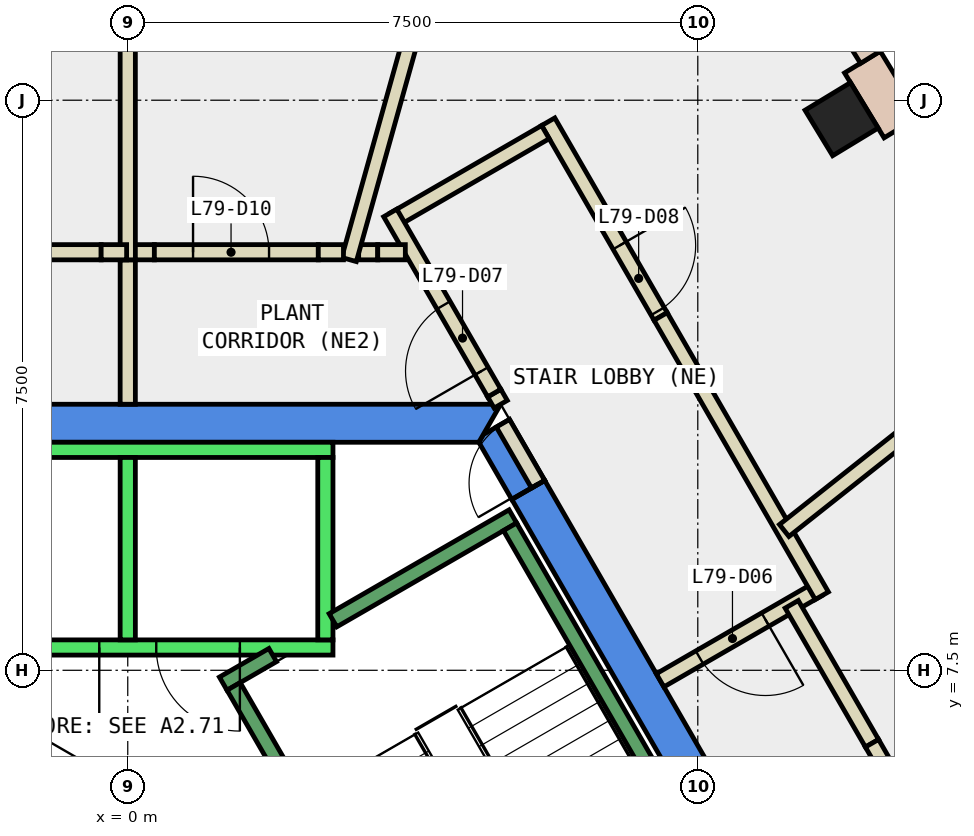
"""IFC4 building model, lengths in metres.
Left out: names, types, materials, properties, quantities, classifications, styles, units other than length and angle.
Written with IfcOpenShell. Run it as: python <this file> out.ifc"""

import sys

from ifc_helpers import new_model, si_unit, direction, frame, frame_2d, origin, origin_2d, place, context, subcontext, project, spatial, polyline, rectangle, outline, extrude, element, fill, save


model = new_model("IFC4")
c1 = context("Model", 3, precision=1e-05, world=origin(), true_north=direction((0.0, 1.0)))
c2 = subcontext(c1, "Body", "Model", "MODEL_VIEW")
j1 = project(units=[si_unit("LENGTHUNIT", "METRE"), si_unit("PLANEANGLEUNIT", "RADIAN")], contexts=[c1])
p1 = place(None, origin())
s1 = spatial("IfcSite", under=j1, at=p1, CompositionType="ELEMENT")
p2 = place(p1, origin())
s2 = spatial("IfcBuilding", under=s1, at=p2, CompositionType="ELEMENT")
p3 = place(p2, frame((0.0, 0.0, 335.9)))
s3 = spatial("IfcBuildingStorey", under=s2, at=p3, CompositionType="ELEMENT", Elevation=335.9)
p4 = place(p3, frame((9.392, 14.751, -0.35), z_axis=(0.0, 0.0, 1.0), x_axis=(-0.519310312694, 0.85458574709, 0.0)))
e1 = element("IfcColumn", 1, at=p4, inside=s3, PredefinedType="COLUMN", context=c2, shape_type="SweptSolid", body=[
    extrude(rectangle(XDim=0.7, YDim=0.7, at=origin_2d()), origin(), (0.0, 0.0, 1.0), 4.4),
])
p5 = place(p3, frame((0.0, 0.0, -0.35)))
e2 = element("IfcWall", 2, at=p5, inside=s3, PredefinedType="SHEAR", context=c2, shape_type="SweptSolid", body=[
    extrude(outline(polyline([(5.486, 9.998), (5.053, 9.748), (9.238, 2.5), (9.815, 2.5), (5.486, 9.998)])), origin(), (0.0, 0.0, 1.0), 4.4),
])
p6 = place(p3, frame((0.0, 0.0, 3.6)))
e3 = element("IfcWall", 3, at=p6, inside=s3, PredefinedType="SHEAR", context=c2, shape_type="SweptSolid", body=[
    extrude(outline(polyline([(5.022, 10.8), (4.677, 10.601), (4.619, 10.5), (5.053, 9.748), (5.486, 9.998), (5.022, 10.8)])), origin(), (0.0, 0.0, 1.0), 0.45),
])
p7 = place(p3, frame((0.0, 0.0, -0.35)))
e4 = element("IfcWall", 4, at=p7, inside=s3, PredefinedType="SHEAR", context=c2, shape_type="SweptSolid", body=[
    extrude(outline(polyline([(4.907, 11.0), (-4.907, 11.0), (-4.619, 10.5), (4.619, 10.5), (4.907, 11.0)])), origin(), (0.0, 0.0, 1.0), 4.4),
])
p8 = place(p3, frame((10.186, 14.648, 0.0), z_axis=(0.0, 0.0, 1.0), x_axis=(-0.520086370604, 0.854113673414, 0.0)))
e5 = element("IfcWall", 5, at=p8, inside=s3, PredefinedType="STANDARD", context=c2, shape_type="SweptSolid", body=[
    extrude(rectangle(XDim=1.0, YDim=0.55, at=frame_2d((0.5, 0.0))), origin(), (0.0, 0.0, 1.0), 4.05),
])
p9 = place(p3, frame((9.769, 15.564, 0.0), z_axis=(0.0, 0.0, 1.0), x_axis=(-0.528920387505, 0.848671446251, 0.0)))
e6 = element("IfcWall", 6, at=p9, inside=s3, PredefinedType="STANDARD", context=c2, shape_type="SweptSolid", body=[
    extrude(rectangle(XDim=7.043, YDim=0.3, at=frame_2d((3.521, 0.0))), origin(), (0.0, 0.0, 1.0), 4.05),
])
p10 = place(p9, frame((0.561, 0.0, 0.9)))
e7 = element("IfcOpeningElement", 7, at=p10, cuts=e6, PredefinedType="OPENING", context=c2, shape_type="SweptSolid", body=[
    extrude(rectangle(XDim=2.4, YDim=3.0, at=frame_2d((1.2, 1.5))), frame((0.0, 0.16, 0.0), z_axis=(0.0, -1.0, 0.0), x_axis=(1.0, 0.0, 0.0)), (0.0, 0.0, 1.0), 0.32),
])
p11 = place(p9, frame((4.082, 0.0, 0.9)))
e8 = element("IfcOpeningElement", 8, at=p11, cuts=e6, PredefinedType="OPENING", context=c2, shape_type="SweptSolid", body=[
    extrude(rectangle(XDim=2.4, YDim=3.0, at=frame_2d((1.2, 1.5))), frame((0.0, 0.16, 0.0), z_axis=(0.0, -1.0, 0.0), x_axis=(1.0, 0.0, 0.0)), (0.0, 0.0, 1.0), 0.32),
])
p12 = place(p3, frame((9.082, 8.568, 0.0), z_axis=(0.0, 0.0, 1.0), x_axis=(-0.865955154139, -0.50012165622, 0.0)))
e9 = element("IfcWall", 9, at=p12, inside=s3, PredefinedType="PARTITIONING", context=c2, shape_type="SweptSolid", body=[
    extrude(rectangle(XDim=2.4, YDim=0.2, at=frame_2d((1.2, 0.0))), origin(), (0.0, 0.0, 1.0), 4.05),
])
p13 = place(p12, frame((0.8, 0.0, 0.0)))
e10 = element("IfcOpeningElement", 10, at=p13, cuts=e9, PredefinedType="OPENING", context=c2, shape_type="SweptSolid", body=[
    extrude(rectangle(XDim=1.0, YDim=2.1, at=frame_2d((0.5, 1.05))), frame((0.0, 0.11, 0.0), z_axis=(0.0, -1.0, 0.0), x_axis=(1.0, 0.0, 0.0)), (0.0, 0.0, 1.0), 0.22),
])
p14 = place(p3, frame((4.907, 11.0, 0.0), z_axis=(0.0, 0.0, 1.0), x_axis=(-0.5004692653, 0.865754303766, 0.0)))
e11 = element("IfcWall", 11, at=p14, inside=s3, PredefinedType="PARTITIONING", context=c2, shape_type="SweptSolid", body=[
    extrude(rectangle(XDim=0.17, YDim=0.2, at=frame_2d((0.085, 0.0))), origin(), (0.0, 0.0, 1.0), 2.4),
])
p15 = place(p3, frame((5.532, 14.717, 0.0), z_axis=(0.0, 0.0, 1.0), x_axis=(0.499955822529, -0.866050908157, 0.0)))
e12 = element("IfcWall", 12, at=p15, inside=s3, PredefinedType="PARTITIONING", context=c2, shape_type="SweptSolid", body=[
    extrude(rectangle(XDim=2.958, YDim=0.2, at=frame_2d((1.479, 0.0))), origin(), (0.0, 0.0, 1.0), 4.05),
])
p16 = place(p15, frame((1.88, 0.0, 0.0)))
e13 = element("IfcOpeningElement", 13, at=p16, cuts=e12, PredefinedType="OPENING", context=c2, shape_type="SweptSolid", body=[
    extrude(rectangle(XDim=1.0, YDim=2.1, at=frame_2d((0.5, 1.05))), frame((0.0, 0.11, 0.0), z_axis=(0.0, -1.0, 0.0), x_axis=(1.0, 0.0, 0.0)), (0.0, 0.0, 1.0), 0.22),
])
p17 = place(p3, frame((3.504, 13.43, 0.0), z_axis=(0.0, 0.0, 1.0), x_axis=(0.865927408828, 0.500169693844, 0.0)))
e14 = element("IfcWall", 14, at=p17, inside=s3, PredefinedType="PARTITIONING", context=c2, shape_type="SweptSolid", body=[
    extrude(rectangle(XDim=2.3, YDim=0.2, at=frame_2d((1.15, 0.0))), origin(), (0.0, 0.0, 1.0), 4.05),
])
p18 = place(p3, frame((8.736, 8.368, 0.0), z_axis=(0.0, 0.0, 1.0), x_axis=(0.500206302225, -0.865906262372, 0.0)))
e15 = element("IfcWall", 15, at=p18, inside=s3, PredefinedType="PARTITIONING", context=c2, shape_type="SweptSolid", body=[
    extrude(rectangle(XDim=2.111, YDim=0.2, at=frame_2d((1.055, 0.0))), origin(), (0.0, 0.0, 1.0), 4.05),
])
p19 = place(p3, frame((3.038, 13.0, 0.0), z_axis=(0.0, 0.0, 1.0), x_axis=(1.0, 0.0, 0.0)))
e16 = element("IfcWall", 16, at=p19, inside=s3, PredefinedType="PARTITIONING", context=c2, shape_type="SweptSolid", body=[
    extrude(rectangle(XDim=0.251, YDim=0.2, at=frame_2d((0.125, 0.0))), origin(), (0.0, 0.0, 1.0), 1.95),
])
p20 = place(p3, frame((0.015, 13.0, 0.0), z_axis=(0.0, 0.0, 1.0), x_axis=(1.0, 0.0, 0.0)))
e17 = element("IfcWall", 17, at=p20, inside=s3, PredefinedType="PARTITIONING", context=c2, shape_type="SweptSolid", body=[
    extrude(rectangle(XDim=0.335, YDim=0.2, at=frame_2d((0.167, 0.0))), origin(), (0.0, 0.0, 1.0), 1.95),
])
p21 = place(p3, frame((0.0, 11.0, 0.0), z_axis=(0.0, 0.0, 1.0), x_axis=(0.0, 1.0, 0.0)))
e18 = element("IfcWall", 18, at=p21, inside=s3, PredefinedType="PARTITIONING", context=c2, shape_type="SweptSolid", body=[
    extrude(rectangle(XDim=1.9, YDim=0.2, at=frame_2d((0.95, 0.0))), origin(), (0.0, 0.0, 1.0), 1.95),
])
p22 = place(p3, frame((2.911, 12.904, 0.0), z_axis=(0.0, 0.0, 1.0), x_axis=(0.269466315524, 0.963009815525, 0.0)))
e19 = element("IfcWall", 19, at=p22, inside=s3, PredefinedType="PARTITIONING", context=c2, shape_type="SweptSolid", body=[
    extrude(rectangle(XDim=8.413, YDim=0.2, at=frame_2d((4.207, 0.0))), origin(), (0.0, 0.0, 1.0), 1.95),
])
p23 = place(p3, frame((0.0, 12.9, 0.0), z_axis=(0.0, 0.0, 1.0), x_axis=(0.0, 1.0, 0.0)))
e20 = element("IfcWall", 20, at=p23, inside=s3, PredefinedType="PARTITIONING", context=c2, shape_type="SweptSolid", body=[
    extrude(rectangle(XDim=10.092, YDim=0.2, at=frame_2d((5.046, 0.0))), origin(), (0.0, 0.0, 1.0), 1.95),
])
p24 = place(p3, frame((5.399, 9.948, 0.0), z_axis=(0.0, 0.0, 1.0), x_axis=(-0.499882215713, 0.866093395895, 0.0)))
e21 = element("IfcWall", 21, at=p24, inside=s3, PredefinedType="PARTITIONING", context=c2, shape_type="SweptSolid", body=[
    extrude(rectangle(XDim=0.926, YDim=0.2, at=frame_2d((0.463, 0.0))), origin(), (0.0, 0.0, 1.0), 2.4),
])
p25 = place(p24, frame((0.017, 0.0, 0.0)))
e22 = element("IfcOpeningElement", 22, at=p25, cuts=e21, PredefinedType="OPENING", context=c2, shape_type="SweptSolid", body=[
    extrude(rectangle(XDim=0.9, YDim=2.1, at=frame_2d((0.45, 1.05))), frame((0.0, 0.11, 0.0), z_axis=(0.0, -1.0, 0.0), x_axis=(1.0, 0.0, 0.0)), (0.0, 0.0, 1.0), 0.22),
])
p26 = place(p3, frame((4.822, 11.147, 0.0), z_axis=(0.0, 0.0, 1.0), x_axis=(-0.499871764879, 0.866099427708, 0.0)))
e23 = element("IfcWall", 23, at=p26, inside=s3, PredefinedType="PARTITIONING", context=c2, shape_type="SweptSolid", body=[
    extrude(rectangle(XDim=2.737, YDim=0.2, at=frame_2d((1.368, 0.0))), origin(), (0.0, 0.0, 1.0), 4.05),
])
p27 = place(p26, frame((0.335, 0.0, 0.0)))
e24 = element("IfcOpeningElement", 24, at=p27, cuts=e23, PredefinedType="OPENING", context=c2, shape_type="SweptSolid", body=[
    extrude(rectangle(XDim=1.0, YDim=2.1, at=frame_2d((0.5, 1.05))), frame((0.0, 0.11, 0.0), z_axis=(0.0, -1.0, 0.0), x_axis=(1.0, 0.0, 0.0)), (0.0, 0.0, 1.0), 0.22),
])
p28 = place(p3, frame((7.011, 12.155, 0.0), z_axis=(0.0, 0.0, 1.0), x_axis=(0.499772878723, -0.866156492612, 0.0)))
e25 = element("IfcWall", 25, at=p28, inside=s3, PredefinedType="PARTITIONING", context=c2, shape_type="SweptSolid", body=[
    extrude(rectangle(XDim=0.838, YDim=0.2, at=frame_2d((0.419, 0.0))), origin(), (0.0, 0.0, 1.0), 1.95),
])
p29 = place(p3, frame((7.43, 11.429, 0.0), z_axis=(0.0, 0.0, 1.0), x_axis=(0.500026652407, -0.866010015463, 0.0)))
e26 = element("IfcWall", 26, at=p29, inside=s3, PredefinedType="PARTITIONING", context=c2, shape_type="SweptSolid", body=[
    extrude(rectangle(XDim=3.404, YDim=0.2, at=frame_2d((1.702, 0.0))), origin(), (0.0, 0.0, 1.0), 4.05),
])
p30 = place(p3, frame((9.792, 6.54, 0.0), z_axis=(0.0, 0.0, 1.0), x_axis=(0.49924847323, -0.866458863408, 0.0)))
e27 = element("IfcWall", 27, at=p30, inside=s3, PredefinedType="PARTITIONING", context=c2, shape_type="SweptSolid", body=[
    extrude(rectangle(XDim=0.743, YDim=0.2, at=frame_2d((0.372, 0.0))), origin(), (0.0, 0.0, 1.0), 1.95),
])
p31 = place(p3, frame((3.289, 13.0, 0.0), z_axis=(0.0, 0.0, 1.0), x_axis=(1.0, 0.0, 0.0)))
e28 = element("IfcWall", 28, at=p31, inside=s3, PredefinedType="PARTITIONING", context=c2, shape_type="SweptSolid", body=[
    extrude(rectangle(XDim=0.363, YDim=0.2, at=frame_2d((0.182, 0.0))), origin(), (0.0, 0.0, 1.0), 4.05),
])
p32 = place(p3, frame((0.35, 13.0, 0.0), z_axis=(0.0, 0.0, 1.0), x_axis=(1.0, 0.0, 0.0)))
e29 = element("IfcWall", 29, at=p32, inside=s3, PredefinedType="PARTITIONING", context=c2, shape_type="SweptSolid", body=[
    extrude(rectangle(XDim=2.157, YDim=0.2, at=frame_2d((1.079, 0.0))), origin(), (0.0, 0.0, 1.0), 4.05),
])
p33 = place(p32, frame((0.509, 0.0, 0.0)))
e30 = element("IfcOpeningElement", 30, at=p33, cuts=e29, PredefinedType="OPENING", context=c2, shape_type="SweptSolid", body=[
    extrude(rectangle(XDim=1.0, YDim=2.1, at=frame_2d((0.5, 1.05))), frame((0.0, 0.11, 0.0), z_axis=(0.0, -1.0, 0.0), x_axis=(1.0, 0.0, 0.0)), (0.0, 0.0, 1.0), 0.22),
])
p34 = place(p3, frame((2.507, 13.0, 0.0), z_axis=(0.0, 0.0, 1.0), x_axis=(1.0, 0.0, 0.0)))
e31 = element("IfcWall", 31, at=p34, inside=s3, PredefinedType="PARTITIONING", context=c2, shape_type="SweptSolid", body=[
    extrude(rectangle(XDim=0.331, YDim=0.2, at=frame_2d((0.166, 0.0))), origin(), (0.0, 0.0, 1.0), 1.95),
])
p35 = place(p3, frame((11.007, 11.215, 0.0), z_axis=(0.0, 0.0, 1.0), x_axis=(-0.784104781382, -0.620628465198, 0.0)))
e32 = element("IfcWall", 32, at=p35, inside=s3, PredefinedType="PARTITIONING", context=c2, shape_type="SweptSolid", body=[
    extrude(rectangle(XDim=3.023, YDim=0.2, at=frame_2d((1.511, 0.0))), origin(), (0.0, 0.0, 1.0), 4.05),
])
p36 = place(p3, frame((-2.507, 13.0, 0.0), z_axis=(0.0, 0.0, 1.0), x_axis=(1.0, 0.0, 0.0)))
e33 = element("IfcWall", 33, at=p36, inside=s3, PredefinedType="PARTITIONING", context=c2, shape_type="SweptSolid", body=[
    extrude(rectangle(XDim=2.157, YDim=0.2, at=frame_2d((1.079, 0.0))), origin(), (0.0, 0.0, 1.0), 4.05),
])
p37 = place(p3, frame((-0.35, 13.0, 0.0), z_axis=(0.0, 0.0, 1.0), x_axis=(1.0, 0.0, 0.0)))
e34 = element("IfcWall", 34, at=p37, inside=s3, PredefinedType="PARTITIONING", context=c2, shape_type="SweptSolid", body=[
    extrude(rectangle(XDim=0.335, YDim=0.2, at=frame_2d((0.167, 0.0))), origin(), (0.0, 0.0, 1.0), 1.95),
])
p38 = place(p3, frame((2.7, 7.8, 0.0), z_axis=(0.0, 0.0, 1.0), x_axis=(-1.0, 0.0, 0.0)))
e35 = element("IfcWall", 35, at=p38, inside=s3, PredefinedType="STANDARD", context=c2, shape_type="SweptSolid", body=[
    extrude(rectangle(XDim=5.4, YDim=0.2, at=frame_2d((2.7, 0.0))), origin(), (0.0, 0.0, 1.0), 4.05),
])
p39 = place(p38, frame((1.225, 0.0, 0.0)))
e36 = element("IfcOpeningElement", 36, at=p39, cuts=e35, PredefinedType="OPENING", context=c2, shape_type="SweptSolid", body=[
    extrude(rectangle(XDim=1.1, YDim=2.1, at=frame_2d((0.55, 1.05))), frame((0.0, 0.11, 0.0), z_axis=(0.0, -1.0, 0.0), x_axis=(1.0, 0.0, 0.0)), (0.0, 0.0, 1.0), 0.22),
])
p40 = place(p38, frame((3.075, 0.0, 0.0)))
e37 = element("IfcOpeningElement", 37, at=p40, cuts=e35, PredefinedType="OPENING", context=c2, shape_type="SweptSolid", body=[
    extrude(rectangle(XDim=1.1, YDim=2.1, at=frame_2d((0.55, 1.05))), frame((0.0, 0.11, 0.0), z_axis=(0.0, -1.0, 0.0), x_axis=(1.0, 0.0, 0.0)), (0.0, 0.0, 1.0), 0.22),
])
p41 = place(p3, frame((2.7, 10.4, 0.0), z_axis=(0.0, 0.0, 1.0), x_axis=(-1.0, 0.0, 0.0)))
e38 = element("IfcWall", 38, at=p41, inside=s3, PredefinedType="STANDARD", context=c2, shape_type="SweptSolid", body=[
    extrude(rectangle(XDim=5.4, YDim=0.2, at=frame_2d((2.7, 0.0))), origin(), (0.0, 0.0, 1.0), 4.05),
])
for number, where, z_axis, x_axis in (
    (39, (2.6, 7.9, 0.0), (0.0, 0.0, 1.0), (0.0, 1.0, 0.0)),
    (40, (0.0, 7.9, 0.0), (0.0, 0.0, 1.0), (0.0, 1.0, 0.0)),
):
    element("IfcWall", number, at=place(p3, frame(where, z_axis=z_axis, x_axis=x_axis)), inside=s3, PredefinedType="STANDARD", context=c2, shape_type="SweptSolid", body=[
        extrude(rectangle(XDim=2.4, YDim=0.2, at=frame_2d((1.2, 0.0))), origin(), (0.0, 0.0, 1.0), 4.05),
    ])
p42 = place(p3, frame((2.7, 8.158, 0.0), z_axis=(0.0, 0.0, 1.0), x_axis=(0.86611865017, 0.499838457731, 0.0)))
e41 = element("IfcWall", 41, at=p42, inside=s3, PredefinedType="STANDARD", context=c2, shape_type="SweptSolid", body=[
    extrude(rectangle(XDim=2.733, YDim=0.2, at=frame_2d((1.366, 0.0))), origin(), (0.0, 0.0, 1.0), 4.05),
])
p43 = place(p3, frame((1.256, 7.324, 0.0), z_axis=(0.0, 0.0, 1.0), x_axis=(0.865915093549, 0.500191014278, 0.0)))
e42 = element("IfcWall", 42, at=p43, inside=s3, PredefinedType="STANDARD", context=c2, shape_type="SweptSolid", body=[
    extrude(rectangle(XDim=0.752, YDim=0.2, at=frame_2d((0.376, 0.0))), origin(), (0.0, 0.0, 1.0), 4.05),
])
p44 = place(p3, frame((4.843, 1.312, 0.0), z_axis=(0.0, 0.0, 1.0), x_axis=(-0.499963383562, 0.866046543262, 0.0)))
e43 = element("IfcWall", 43, at=p44, inside=s3, PredefinedType="STANDARD", context=c2, shape_type="SweptSolid", body=[
    extrude(rectangle(XDim=6.9, YDim=0.2, at=frame_2d((3.45, 0.0))), origin(), (0.0, 0.0, 1.0), 4.05),
])
p45 = place(p44, frame((0.45, 0.0, 0.0)))
e44 = element("IfcOpeningElement", 44, at=p45, cuts=e43, PredefinedType="OPENING", context=c2, shape_type="SweptSolid", body=[
    extrude(rectangle(XDim=1.1, YDim=2.2, at=frame_2d((0.55, 1.1))), frame((0.0, 0.11, 0.0), z_axis=(0.0, -1.0, 0.0), x_axis=(1.0, 0.0, 0.0)), (0.0, 0.0, 1.0), 0.22),
])
p46 = place(p3, frame((8.48, 3.412, 0.0), z_axis=(0.0, 0.0, 1.0), x_axis=(-0.499978703459, 0.866037698999, 0.0)))
e45 = element("IfcWall", 45, at=p46, inside=s3, PredefinedType="STANDARD", context=c2, shape_type="SweptSolid", body=[
    extrude(rectangle(XDim=6.9, YDim=0.2, at=frame_2d((3.45, 0.0))), origin(), (0.0, 0.0, 1.0), 4.05),
])
p47 = place(p13, origin())
e46 = element("IfcDoor", 46, at=p47, inside=s3, OperationType="SINGLE_SWING_LEFT", PredefinedType="DOOR", context=c2, shape_type="SweptSolid", body=[
    extrude(rectangle(XDim=1.0, YDim=2.1, at=frame_2d((0.5, 1.05))), frame((0.0, 0.025, 0.0), z_axis=(0.0, -1.0, 0.0), x_axis=(1.0, 0.0, 0.0)), (0.0, 0.0, 1.0), 0.05),
])
fill(e10, e46)
p48 = place(p27, origin())
e47 = element("IfcDoor", 47, at=p48, inside=s3, OperationType="SINGLE_SWING_RIGHT", PredefinedType="DOOR", context=c2, shape_type="SweptSolid", body=[
    extrude(rectangle(XDim=1.0, YDim=2.1, at=frame_2d((0.5, 1.05))), frame((0.0, 0.025, 0.0), z_axis=(0.0, -1.0, 0.0), x_axis=(1.0, 0.0, 0.0)), (0.0, 0.0, 1.0), 0.05),
])
fill(e24, e47)
p49 = place(p16, origin())
e48 = element("IfcDoor", 48, at=p49, inside=s3, OperationType="SINGLE_SWING_LEFT", PredefinedType="DOOR", context=c2, shape_type="SweptSolid", body=[
    extrude(rectangle(XDim=1.0, YDim=2.1, at=frame_2d((0.5, 1.05))), frame((0.0, 0.025, 0.0), z_axis=(0.0, -1.0, 0.0), x_axis=(1.0, 0.0, 0.0)), (0.0, 0.0, 1.0), 0.05),
])
fill(e13, e48)
p50 = place(p33, origin())
e49 = element("IfcDoor", 49, at=p50, inside=s3, OperationType="SINGLE_SWING_LEFT", PredefinedType="DOOR", context=c2, shape_type="SweptSolid", body=[
    extrude(rectangle(XDim=1.0, YDim=2.1, at=frame_2d((0.5, 1.05))), frame((0.0, 0.025, 0.0), z_axis=(0.0, -1.0, 0.0), x_axis=(1.0, 0.0, 0.0)), (0.0, 0.0, 1.0), 0.05),
])
fill(e30, e49)
p51 = place(p25, origin())
e50 = element("IfcDoor", 50, at=p51, inside=s3, OperationType="SINGLE_SWING_LEFT", PredefinedType="DOOR", context=c2, shape_type="SweptSolid", body=[
    extrude(rectangle(XDim=0.9, YDim=2.1, at=frame_2d((0.45, 1.05))), frame((0.0, 0.025, 0.0), z_axis=(0.0, -1.0, 0.0), x_axis=(1.0, 0.0, 0.0)), (0.0, 0.0, 1.0), 0.05),
])
fill(e22, e50)
p52 = place(p39, origin())
e51 = element("IfcDoor", 51, at=p52, inside=s3, OperationType="SLIDING_TO_LEFT", PredefinedType="DOOR", context=c2, shape_type="SweptSolid", body=[
    extrude(rectangle(XDim=1.1, YDim=2.1, at=frame_2d((0.55, 1.05))), frame((0.0, 0.025, 0.0), z_axis=(0.0, -1.0, 0.0), x_axis=(1.0, 0.0, 0.0)), (0.0, 0.0, 1.0), 0.05),
])
fill(e36, e51)
p53 = place(p40, origin())
e52 = element("IfcDoor", 52, at=p53, inside=s3, OperationType="SLIDING_TO_LEFT", PredefinedType="DOOR", context=c2, shape_type="SweptSolid", body=[
    extrude(rectangle(XDim=1.1, YDim=2.1, at=frame_2d((0.55, 1.05))), frame((0.0, 0.025, 0.0), z_axis=(0.0, -1.0, 0.0), x_axis=(1.0, 0.0, 0.0)), (0.0, 0.0, 1.0), 0.05),
])
fill(e37, e52)
save(model, sys.argv[1])
